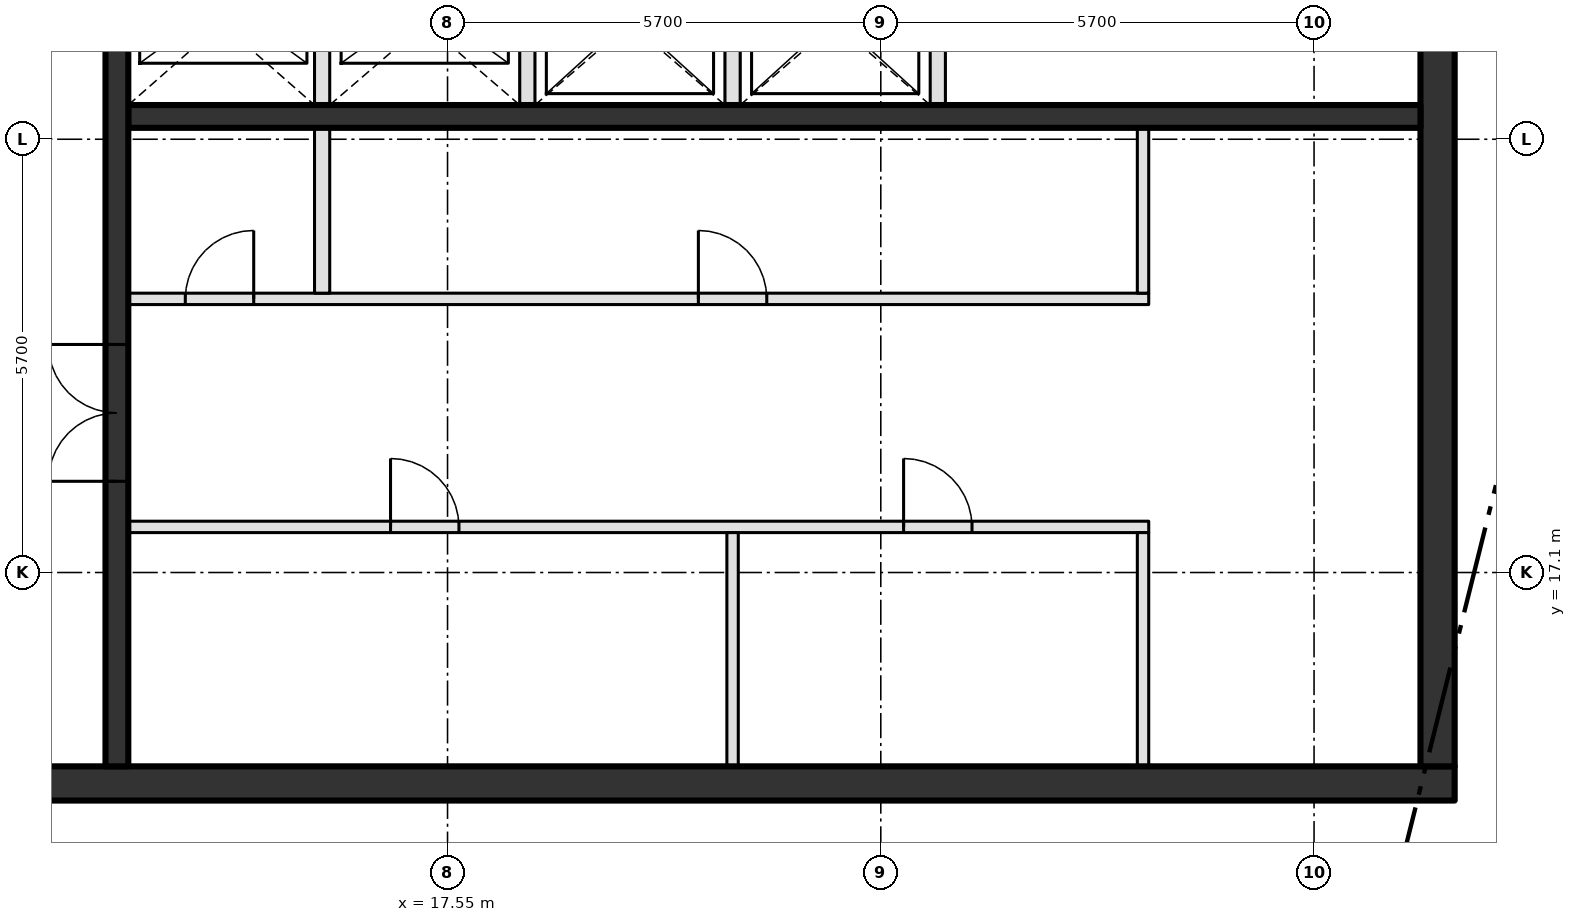
"""IFC4 building model, lengths in metres.
Left out: names, types, materials, properties, quantities, classifications, styles, units other than length and angle.
Written with IfcOpenShell. Run it as: python <this file> out.ifc"""

import sys

from ifc_helpers import new_model, si_unit, direction, frame, frame_2d, origin, place, context, subcontext, project, spatial, rectangle, extrude, element, fill, save


model = new_model("IFC4")
c1 = context("Model", 3, precision=1e-05, world=origin(), true_north=direction((0.0, 1.0)))
c2 = subcontext(c1, "Body", "Model", "MODEL_VIEW")
j1 = project(units=[si_unit("LENGTHUNIT", "METRE"), si_unit("PLANEANGLEUNIT", "RADIAN")], contexts=[c1])
p1 = place(None, origin())
s1 = spatial("IfcSite", under=j1, at=p1, CompositionType="ELEMENT")
p2 = place(p1, origin())
s2 = spatial("IfcBuilding", under=s1, at=p2, CompositionType="ELEMENT")
p3 = place(p2, frame((0.0, 0.0, 419.4)))
s3 = spatial("IfcBuildingStorey", under=s2, at=p3, CompositionType="ELEMENT", Elevation=419.4)
p4 = place(p3, frame((8.0, 14.325, -0.45), z_axis=(0.0, 0.0, 1.0), x_axis=(1.0, 0.0, 0.0)))
e1 = element("IfcWall", 1, at=p4, inside=s3, PredefinedType="SHEAR", context=c2, shape_type="SweptSolid", body=[
    extrude(rectangle(XDim=22.8, YDim=0.45, at=frame_2d((11.4, 0.0))), origin(), (0.0, 0.0, 1.0), 4.95),
])
p5 = place(p4, frame((2.3, 0.0, 0.45)))
e2 = element("IfcOpeningElement", 2, at=p5, cuts=e1, PredefinedType="OPENING", context=c2, shape_type="SweptSolid", body=[
    extrude(rectangle(XDim=1.8, YDim=2.1, at=frame_2d((0.9, 1.05))), frame((0.0, 0.235, 0.0), z_axis=(0.0, -1.0, 0.0), x_axis=(1.0, 0.0, 0.0)), (0.0, 0.0, 1.0), 0.47),
])
p6 = place(p3, frame((30.575, 14.55, -0.45), z_axis=(0.0, 0.0, 1.0), x_axis=(0.0, 1.0, 0.0)))
e3 = element("IfcWall", 3, at=p6, inside=s3, PredefinedType="SHEAR", context=c2, shape_type="SweptSolid", body=[
    extrude(rectangle(XDim=21.15, YDim=0.45, at=frame_2d((10.575, 0.0))), origin(), (0.0, 0.0, 1.0), 4.95),
])
p7 = place(p3, frame((13.35, 17.7, 0.0), z_axis=(0.0, 0.0, 1.0), x_axis=(1.0, 0.0, 0.0)))
e4 = element("IfcWall", 4, at=p7, inside=s3, PredefinedType="PARTITIONING", context=c2, shape_type="SweptSolid", body=[
    extrude(rectangle(XDim=13.425, YDim=0.15, at=frame_2d((6.712, 0.0))), origin(), (0.0, 0.0, 1.0), 4.5),
])
p8 = place(p7, frame((3.45, 0.0, 0.0)))
e5 = element("IfcOpeningElement", 5, at=p8, cuts=e4, PredefinedType="OPENING", context=c2, shape_type="SweptSolid", body=[
    extrude(rectangle(XDim=0.9, YDim=2.1, at=frame_2d((0.45, 1.05))), frame((0.0, 0.085, 0.0), z_axis=(0.0, -1.0, 0.0), x_axis=(1.0, 0.0, 0.0)), (0.0, 0.0, 1.0), 0.17),
])
p9 = place(p7, frame((10.2, 0.0, 0.0)))
e6 = element("IfcOpeningElement", 6, at=p9, cuts=e4, PredefinedType="OPENING", context=c2, shape_type="SweptSolid", body=[
    extrude(rectangle(XDim=0.9, YDim=2.1, at=frame_2d((0.45, 1.05))), frame((0.0, 0.085, 0.0), z_axis=(0.0, -1.0, 0.0), x_axis=(1.0, 0.0, 0.0)), (0.0, 0.0, 1.0), 0.17),
])
p10 = place(p3, frame((13.35, 20.7, 0.0), z_axis=(0.0, 0.0, 1.0), x_axis=(1.0, 0.0, 0.0)))
e7 = element("IfcWall", 7, at=p10, inside=s3, PredefinedType="PARTITIONING", context=c2, shape_type="SweptSolid", body=[
    extrude(rectangle(XDim=13.425, YDim=0.15, at=frame_2d((6.712, 0.0))), origin(), (0.0, 0.0, 1.0), 4.5),
])
p11 = place(p10, frame((0.75, 0.0, 0.0)))
e8 = element("IfcOpeningElement", 8, at=p11, cuts=e7, PredefinedType="OPENING", context=c2, shape_type="SweptSolid", body=[
    extrude(rectangle(XDim=0.9, YDim=2.1, at=frame_2d((0.45, 1.05))), frame((0.0, 0.085, 0.0), z_axis=(0.0, -1.0, 0.0), x_axis=(1.0, 0.0, 0.0)), (0.0, 0.0, 1.0), 0.17),
])
p12 = place(p10, frame((7.5, 0.0, 0.0)))
e9 = element("IfcOpeningElement", 9, at=p12, cuts=e7, PredefinedType="OPENING", context=c2, shape_type="SweptSolid", body=[
    extrude(rectangle(XDim=0.9, YDim=2.1, at=frame_2d((0.45, 1.05))), frame((0.0, 0.085, 0.0), z_axis=(0.0, -1.0, 0.0), x_axis=(1.0, 0.0, 0.0)), (0.0, 0.0, 1.0), 0.17),
])
p13 = place(p3, frame((13.35, 23.1, 0.0), z_axis=(0.0, 0.0, 1.0), x_axis=(1.0, 0.0, 0.0)))
e10 = element("IfcWall", 10, at=p13, inside=s3, PredefinedType="SHEAR", context=c2, shape_type="SweptSolid", body=[
    extrude(rectangle(XDim=17.0, YDim=0.3, at=frame_2d((8.5, 0.0))), origin(), (0.0, 0.0, 1.0), 4.5),
])
p14 = place(p3, frame((13.2, 14.55, 0.0), z_axis=(0.0, 0.0, 1.0), x_axis=(0.0, 1.0, 0.0)))
e11 = element("IfcWall", 11, at=p14, inside=s3, PredefinedType="SHEAR", context=c2, shape_type="SweptSolid", body=[
    extrude(rectangle(XDim=21.15, YDim=0.3, at=frame_2d((10.575, 0.0))), origin(), (0.0, 0.0, 1.0), 4.5),
])
p15 = place(p14, frame((3.75, 0.0, 0.0)))
e12 = element("IfcOpeningElement", 12, at=p15, cuts=e11, PredefinedType="OPENING", context=c2, shape_type="SweptSolid", body=[
    extrude(rectangle(XDim=1.8, YDim=2.1, at=frame_2d((0.9, 1.05))), frame((0.0, 0.16, 0.0), z_axis=(0.0, -1.0, 0.0), x_axis=(1.0, 0.0, 0.0)), (0.0, 0.0, 1.0), 0.32),
])
p16 = place(p14, frame((11.85, 0.0, 0.0)))
e13 = element("IfcOpeningElement", 13, at=p16, cuts=e11, PredefinedType="OPENING", context=c2, shape_type="SweptSolid", body=[
    extrude(rectangle(XDim=1.2, YDim=2.1, at=frame_2d((0.6, 1.05))), frame((0.0, 0.16, 0.0), z_axis=(0.0, -1.0, 0.0), x_axis=(1.0, 0.0, 0.0)), (0.0, 0.0, 1.0), 0.32),
])
p17 = place(p3, frame((15.9, 20.775, 0.0), z_axis=(0.0, 0.0, 1.0), x_axis=(0.0, 1.0, 0.0)))
e14 = element("IfcWall", 14, at=p17, inside=s3, PredefinedType="SOLIDWALL", context=c2, shape_type="SweptSolid", body=[
    extrude(rectangle(XDim=4.625, YDim=0.2, at=frame_2d((2.312, 0.0))), origin(), (0.0, 0.0, 1.0), 4.5),
])
p18 = place(p3, frame((18.6, 23.25, 0.0), z_axis=(0.0, 0.0, 1.0), x_axis=(0.0, 1.0, 0.0)))
e15 = element("IfcWall", 15, at=p18, inside=s3, PredefinedType="SOLIDWALL", context=c2, shape_type="SweptSolid", body=[
    extrude(rectangle(XDim=5.15, YDim=0.2, at=frame_2d((2.575, 0.0))), origin(), (0.0, 0.0, 1.0), 4.5),
])
p19 = place(p18, frame((3.15, 0.0, 0.0)))
e16 = element("IfcOpeningElement", 16, at=p19, cuts=e15, PredefinedType="OPENING", context=c2, shape_type="SweptSolid", body=[
    extrude(rectangle(XDim=1.2, YDim=2.1, at=frame_2d((0.6, 1.05))), frame((0.0, 0.11, 0.0), z_axis=(0.0, -1.0, 0.0), x_axis=(1.0, 0.0, 0.0)), (0.0, 0.0, 1.0), 0.22),
])
p20 = place(p3, frame((21.3, 14.55, 0.0), z_axis=(0.0, 0.0, 1.0), x_axis=(0.0, 1.0, 0.0)))
e17 = element("IfcWall", 17, at=p20, inside=s3, PredefinedType="PARTITIONING", context=c2, shape_type="SweptSolid", body=[
    extrude(rectangle(XDim=3.075, YDim=0.15, at=frame_2d((1.538, 0.0))), origin(), (0.0, 0.0, 1.0), 4.5),
])
for number, where, z_axis, x_axis in (
    (18, (21.3, 23.25, 0.0), (0.0, 0.0, 1.0), (0.0, 1.0, 0.0)),
    (19, (24.0, 23.25, 0.0), (0.0, 0.0, 1.0), (0.0, 1.0, 0.0)),
):
    element("IfcWall", number, at=place(p3, frame(where, z_axis=z_axis, x_axis=x_axis)), inside=s3, PredefinedType="SOLIDWALL", context=c2, shape_type="SweptSolid", body=[
        extrude(rectangle(XDim=2.15, YDim=0.2, at=frame_2d((1.075, 0.0))), origin(), (0.0, 0.0, 1.0), 4.5),
    ])
p21 = place(p3, frame((26.7, 14.55, 0.0), z_axis=(0.0, 0.0, 1.0), x_axis=(0.0, 1.0, 0.0)))
e20 = element("IfcWall", 20, at=p21, inside=s3, PredefinedType="PARTITIONING", context=c2, shape_type="SweptSolid", body=[
    extrude(rectangle(XDim=3.075, YDim=0.15, at=frame_2d((1.538, 0.0))), origin(), (0.0, 0.0, 1.0), 4.5),
])
p22 = place(p3, frame((26.7, 20.775, 0.0), z_axis=(0.0, 0.0, 1.0), x_axis=(0.0, 1.0, 0.0)))
e21 = element("IfcWall", 21, at=p22, inside=s3, PredefinedType="PARTITIONING", context=c2, shape_type="SweptSolid", body=[
    extrude(rectangle(XDim=2.175, YDim=0.15, at=frame_2d((1.087, 0.0))), origin(), (0.0, 0.0, 1.0), 4.5),
])
p23 = place(p8, origin())
e22 = element("IfcDoor", 22, at=p23, inside=s3, OperationType="SINGLE_SWING_LEFT", PredefinedType="DOOR", context=c2, shape_type="SweptSolid", body=[
    extrude(rectangle(XDim=0.9, YDim=2.1, at=frame_2d((0.45, 1.05))), frame((0.0, 0.025, 0.0), z_axis=(0.0, -1.0, 0.0), x_axis=(1.0, 0.0, 0.0)), (0.0, 0.0, 1.0), 0.05),
])
fill(e5, e22)
p24 = place(p9, origin())
e23 = element("IfcDoor", 23, at=p24, inside=s3, OperationType="SINGLE_SWING_LEFT", PredefinedType="DOOR", context=c2, shape_type="SweptSolid", body=[
    extrude(rectangle(XDim=0.9, YDim=2.1, at=frame_2d((0.45, 1.05))), frame((0.0, 0.025, 0.0), z_axis=(0.0, -1.0, 0.0), x_axis=(1.0, 0.0, 0.0)), (0.0, 0.0, 1.0), 0.05),
])
fill(e6, e23)
p25 = place(p11, origin())
e24 = element("IfcDoor", 24, at=p25, inside=s3, OperationType="SINGLE_SWING_RIGHT", PredefinedType="DOOR", context=c2, shape_type="SweptSolid", body=[
    extrude(rectangle(XDim=0.9, YDim=2.1, at=frame_2d((0.45, 1.05))), frame((0.0, 0.025, 0.0), z_axis=(0.0, -1.0, 0.0), x_axis=(1.0, 0.0, 0.0)), (0.0, 0.0, 1.0), 0.05),
])
fill(e8, e24)
p26 = place(p12, origin())
e25 = element("IfcDoor", 25, at=p26, inside=s3, OperationType="SINGLE_SWING_LEFT", PredefinedType="DOOR", context=c2, shape_type="SweptSolid", body=[
    extrude(rectangle(XDim=0.9, YDim=2.1, at=frame_2d((0.45, 1.05))), frame((0.0, 0.025, 0.0), z_axis=(0.0, -1.0, 0.0), x_axis=(1.0, 0.0, 0.0)), (0.0, 0.0, 1.0), 0.05),
])
fill(e9, e25)
p27 = place(p15, origin())
e26 = element("IfcDoor", 26, at=p27, inside=s3, OperationType="DOUBLE_DOOR_SINGLE_SWING", PredefinedType="DOOR", context=c2, shape_type="SweptSolid", body=[
    extrude(rectangle(XDim=1.8, YDim=2.1, at=frame_2d((0.9, 1.05))), frame((0.0, 0.025, 0.0), z_axis=(0.0, -1.0, 0.0), x_axis=(1.0, 0.0, 0.0)), (0.0, 0.0, 1.0), 0.05),
])
fill(e12, e26)
save(model, sys.argv[1])
